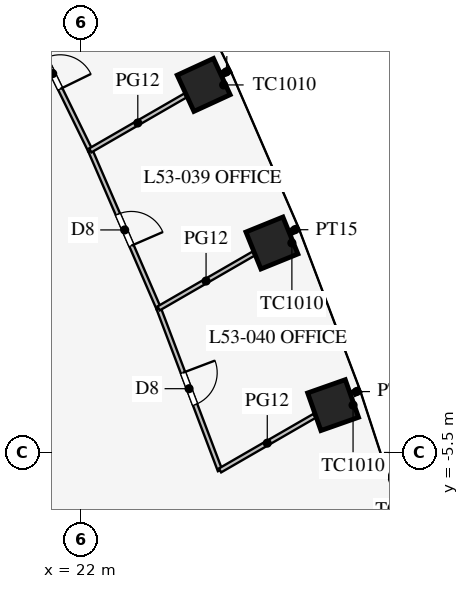
"""IFC4 building model, lengths in metres.
Left out: names, types, materials, properties, quantities, classifications, styles, units other than length and angle.
Written with IfcOpenShell. Run it as: python <this file> out.ifc"""

import sys

from ifc_helpers import new_model, si_unit, direction, frame, frame_2d, origin, origin_2d, place, context, subcontext, project, spatial, rectangle, extrude, element, fill, save


model = new_model("IFC4")
c1 = context("Model", 3, precision=1e-05, world=origin(), true_north=direction((0.0, 1.0)))
c2 = subcontext(c1, "Body", "Model", "MODEL_VIEW")
j1 = project(units=[si_unit("LENGTHUNIT", "METRE"), si_unit("PLANEANGLEUNIT", "RADIAN")], contexts=[c1])
p1 = place(None, origin())
s1 = spatial("IfcSite", under=j1, at=p1, CompositionType="ELEMENT")
p2 = place(p1, origin())
s2 = spatial("IfcBuilding", under=s1, at=p2, CompositionType="ELEMENT")
p3 = place(p2, frame((0.0, 0.0, 231.7)))
s3 = spatial("IfcBuildingStorey", under=s2, at=p3, CompositionType="ELEMENT", Elevation=231.7)
for number, where, z_axis, x_axis in (
    (1, (28.632, -4.254, 0.0), (0.0, 0.0, 1.0), (-0.332, 0.943, 0.0)),
    (2, (27.022, 0.013, 0.0), (0.0, 0.0, 1.0), (-0.376, 0.927, 0.0)),
    (3, (25.227, 4.172, 0.0), (0.0, 0.0, 1.0), (-0.418, 0.908, 0.0)),
):
    element("IfcColumn", number, at=place(p3, frame(where, z_axis=z_axis, x_axis=x_axis)), inside=s3, PredefinedType="COLUMN", context=c2, shape_type="SweptSolid", body=[
        extrude(rectangle(XDim=1.05, YDim=1.05, at=origin_2d()), origin(), (0.0, 0.0, 1.0), 4.2),
    ])
p4 = place(p3, frame((27.539, 0.311, 0.0), z_axis=(0.0, 0.0, 1.0), x_axis=(0.865534352121, 0.500849563539, 0.0)))
e4 = element("IfcWall", 4, at=p4, inside=s3, PredefinedType="PARTITIONING", context=c2, shape_type="SweptSolid", body=[
    extrude(rectangle(XDim=0.206, YDim=0.15, at=frame_2d((0.103, 0.0))), origin(), (0.0, 0.0, 1.0), 2.9),
])
p5 = place(p3, frame((29.166, -3.946, 0.0), z_axis=(0.0, 0.0, 1.0), x_axis=(0.866439280089, 0.499282459054, 0.0)))
e5 = element("IfcWall", 5, at=p5, inside=s3, PredefinedType="PARTITIONING", context=c2, shape_type="SweptSolid", body=[
    extrude(rectangle(XDim=0.192, YDim=0.15, at=frame_2d((0.096, 0.0))), origin(), (0.0, 0.0, 1.0), 2.9),
])
p6 = place(p3, frame((25.725, 4.46, 0.0), z_axis=(0.0, 0.0, 1.0), x_axis=(0.865675623716, 0.500605348058, 0.0)))
e6 = element("IfcWall", 6, at=p6, inside=s3, PredefinedType="PARTITIONING", context=c2, shape_type="SweptSolid", body=[
    extrude(rectangle(XDim=0.223, YDim=0.15, at=frame_2d((0.112, 0.0))), origin(), (0.0, 0.0, 1.0), 2.9),
])
p7 = place(p3, frame((24.041, -1.708, 0.0), z_axis=(0.0, 0.0, 1.0), x_axis=(-0.397208101111, 0.917728567939, 0.0)))
e7 = element("IfcWall", 7, at=p7, inside=s3, PredefinedType="PARTITIONING", context=c2, shape_type="SweptSolid", body=[
    extrude(rectangle(XDim=4.53, YDim=0.12, at=frame_2d((2.265, 0.0))), origin(), (0.0, 0.0, 1.0), 2.9),
])
p8 = place(p7, frame((1.8, 0.0, 0.15)))
e8 = element("IfcOpeningElement", 8, at=p8, cuts=e7, PredefinedType="OPENING", context=c2, shape_type="SweptSolid", body=[
    extrude(rectangle(XDim=0.9, YDim=2.1, at=frame_2d((0.45, 1.05))), frame((0.0, 0.07, 0.0), z_axis=(0.0, -1.0, 0.0), x_axis=(1.0, 0.0, 0.0)), (0.0, 0.0, 1.0), 0.14),
])
p9 = place(p3, frame((25.656, -5.972, 0.0), z_axis=(0.0, 0.0, 1.0), x_axis=(-0.3542667952, 0.935144394101, 0.0)))
e9 = element("IfcWall", 9, at=p9, inside=s3, PredefinedType="PARTITIONING", context=c2, shape_type="SweptSolid", body=[
    extrude(rectangle(XDim=4.559, YDim=0.12, at=frame_2d((2.28, 0.0))), origin(), (0.0, 0.0, 1.0), 2.9),
])
p10 = place(p9, frame((1.85, 0.0, 0.15)))
e10 = element("IfcOpeningElement", 10, at=p10, cuts=e9, PredefinedType="OPENING", context=c2, shape_type="SweptSolid", body=[
    extrude(rectangle(XDim=0.9, YDim=2.1, at=frame_2d((0.45, 1.05))), frame((0.0, 0.07, 0.0), z_axis=(0.0, -1.0, 0.0), x_axis=(1.0, 0.0, 0.0)), (0.0, 0.0, 1.0), 0.14),
])
p11 = place(p3, frame((22.242, 2.449, 0.0), z_axis=(0.0, 0.0, 1.0), x_axis=(-0.43911984878, 0.898428493764, 0.0)))
e11 = element("IfcWall", 11, at=p11, inside=s3, PredefinedType="PARTITIONING", context=c2, shape_type="SweptSolid", body=[
    extrude(rectangle(XDim=4.511, YDim=0.12, at=frame_2d((2.255, 0.0))), origin(), (0.0, 0.0, 1.0), 2.9),
])
p12 = place(p11, frame((1.8, 0.0, 0.15)))
e12 = element("IfcOpeningElement", 12, at=p12, cuts=e11, PredefinedType="OPENING", context=c2, shape_type="SweptSolid", body=[
    extrude(rectangle(XDim=0.9, YDim=2.1, at=frame_2d((0.45, 1.05))), frame((0.0, 0.07, 0.0), z_axis=(0.0, -1.0, 0.0), x_axis=(1.0, 0.0, 0.0)), (0.0, 0.0, 1.0), 0.14),
])
p13 = place(p3, frame((24.041, -1.708, 0.0), z_axis=(0.0, 0.0, 1.0), x_axis=(0.866055815229, 0.499947322133, 0.0)))
e13 = element("IfcWall", 13, at=p13, inside=s3, PredefinedType="PARTITIONING", context=c2, shape_type="SweptSolid", body=[
    extrude(rectangle(XDim=2.882, YDim=0.12, at=frame_2d((1.441, 0.0))), origin(), (0.0, 0.0, 1.0), 2.9),
])
p14 = place(p3, frame((25.656, -5.972, 0.0), z_axis=(0.0, 0.0, 1.0), x_axis=(0.866021348281, 0.500007024272, 0.0)))
e14 = element("IfcWall", 14, at=p14, inside=s3, PredefinedType="PARTITIONING", context=c2, shape_type="SweptSolid", body=[
    extrude(rectangle(XDim=2.872, YDim=0.12, at=frame_2d((1.436, 0.0))), origin(), (0.0, 0.0, 1.0), 2.9),
])
p15 = place(p3, frame((22.242, 2.449, 0.0), z_axis=(0.0, 0.0, 1.0), x_axis=(0.866035023289, 0.49998333816, 0.0)))
e15 = element("IfcWall", 15, at=p15, inside=s3, PredefinedType="PARTITIONING", context=c2, shape_type="SweptSolid", body=[
    extrude(rectangle(XDim=2.889, YDim=0.12, at=frame_2d((1.445, 0.0))), origin(), (0.0, 0.0, 1.0), 2.9),
])
p16 = place(p12, frame((0.9, 0.0, 0.0), z_axis=(0.0, 0.0, 1.0), x_axis=(-1.0, 0.0, 0.0)))
e16 = element("IfcDoor", 16, at=p16, inside=s3, OperationType="SINGLE_SWING_RIGHT", PredefinedType="DOOR", context=c2, shape_type="SweptSolid", body=[
    extrude(rectangle(XDim=0.9, YDim=2.1, at=frame_2d((0.45, 1.05))), frame((0.0, 0.025, 0.0), z_axis=(0.0, -1.0, 0.0), x_axis=(1.0, 0.0, 0.0)), (0.0, 0.0, 1.0), 0.05),
])
fill(e12, e16)
p17 = place(p8, frame((0.9, 0.0, 0.0), z_axis=(0.0, 0.0, 1.0), x_axis=(-1.0, 0.0, 0.0)))
e17 = element("IfcDoor", 17, at=p17, inside=s3, OperationType="SINGLE_SWING_RIGHT", PredefinedType="DOOR", context=c2, shape_type="SweptSolid", body=[
    extrude(rectangle(XDim=0.9, YDim=2.1, at=frame_2d((0.45, 1.05))), frame((0.0, 0.025, 0.0), z_axis=(0.0, -1.0, 0.0), x_axis=(1.0, 0.0, 0.0)), (0.0, 0.0, 1.0), 0.05),
])
fill(e8, e17)
p18 = place(p10, frame((0.9, 0.0, 0.0), z_axis=(0.0, 0.0, 1.0), x_axis=(-1.0, 0.0, 0.0)))
e18 = element("IfcDoor", 18, at=p18, inside=s3, OperationType="SINGLE_SWING_LEFT", PredefinedType="DOOR", context=c2, shape_type="SweptSolid", body=[
    extrude(rectangle(XDim=0.9, YDim=2.1, at=frame_2d((0.45, 1.05))), frame((0.0, 0.025, 0.0), z_axis=(0.0, -1.0, 0.0), x_axis=(1.0, 0.0, 0.0)), (0.0, 0.0, 1.0), 0.05),
])
fill(e10, e18)
save(model, sys.argv[1])
